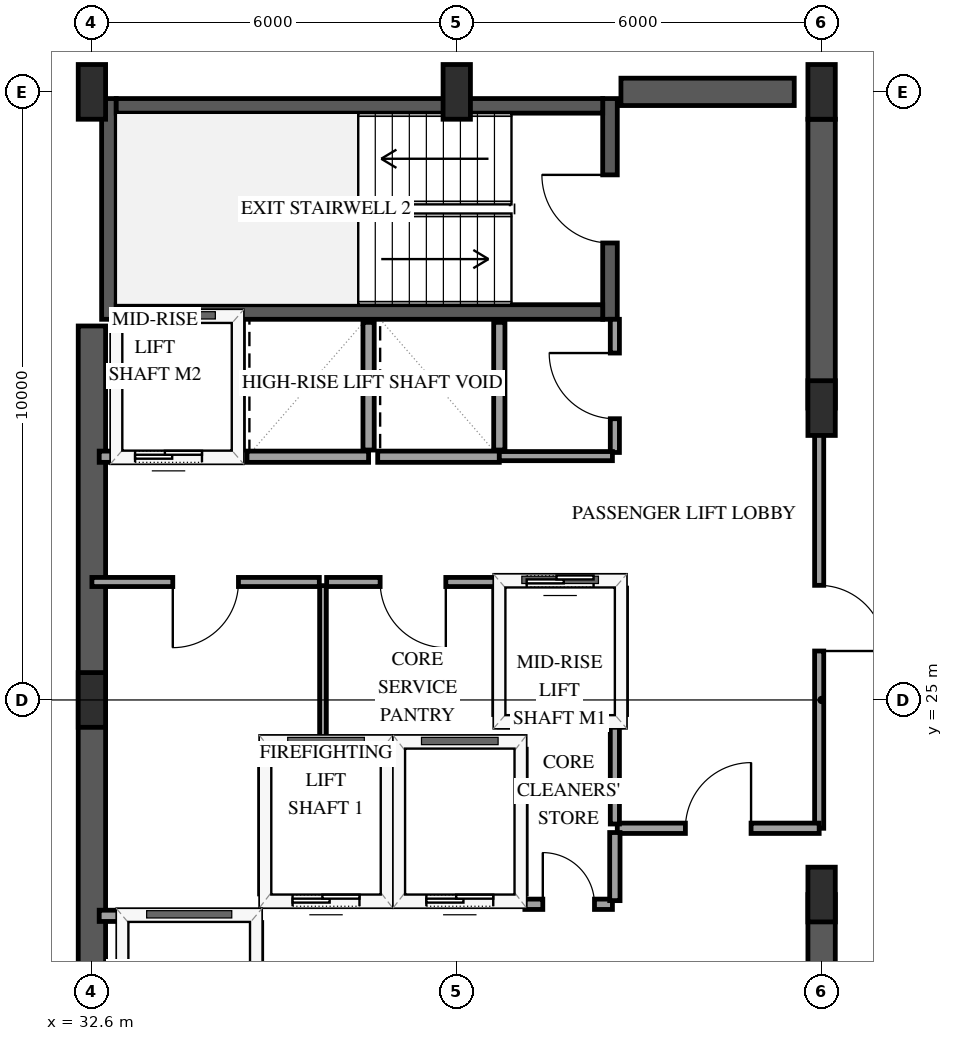
"""IFC4 building model, lengths in metres.
Left out: names, types, materials, properties, quantities, classifications, styles, units other than length and angle.
Written with IfcOpenShell. Run it as: python <this file> out.ifc"""

import sys

from ifc_helpers import new_model, si_unit, direction, frame, frame_2d, origin, origin_2d, place, context, subcontext, project, spatial, rectangle, extrude, element, fill, save


model = new_model("IFC4")
c1 = context("Model", 3, precision=1e-05, world=origin(), true_north=direction((0.0, 1.0)))
c2 = subcontext(c1, "Body", "Model", "MODEL_VIEW")
j1 = project(units=[si_unit("LENGTHUNIT", "METRE"), si_unit("PLANEANGLEUNIT", "RADIAN")], contexts=[c1])
p1 = place(None, origin())
s1 = spatial("IfcSite", under=j1, at=p1, CompositionType="ELEMENT")
p2 = place(p1, origin())
s2 = spatial("IfcBuilding", under=s1, at=p2, CompositionType="ELEMENT")
p3 = place(p2, frame((0.0, 0.0, 215.8)))
s3 = spatial("IfcBuildingStorey", under=s2, at=p3, CompositionType="ELEMENT", Elevation=215.8)
p4 = place(p3, frame((32.88, 31.26, 0.0), z_axis=(0.0, 0.0, 1.0), x_axis=(0.0, 1.0, 0.0)))
e1 = element("IfcWall", 1, at=p4, inside=s3, PredefinedType="SHEAR", context=c2, shape_type="SweptSolid", body=[
    extrude(rectangle(XDim=3.63, YDim=0.24, at=frame_2d((1.815, 0.0))), origin(), (0.0, 0.0, 1.0), 3.6),
])
p5 = place(p3, frame((41.12, 31.26, 0.0), z_axis=(0.0, 0.0, 1.0), x_axis=(0.0, 1.0, 0.0)))
e2 = element("IfcWall", 2, at=p5, inside=s3, PredefinedType="SHEAR", context=c2, shape_type="SweptSolid", body=[
    extrude(rectangle(XDim=3.63, YDim=0.24, at=frame_2d((1.815, 0.0))), origin(), (0.0, 0.0, 1.0), 3.6),
])
p6 = place(p5, frame((1.255, 0.0, 0.0)))
e3 = element("IfcOpeningElement", 3, at=p6, cuts=e2, PredefinedType="OPENING", context=c2, shape_type="SweptSolid", body=[
    extrude(rectangle(XDim=1.12, YDim=2.15, at=frame_2d((0.56, 1.075))), frame((0.0, 0.13, 0.0), z_axis=(0.0, -1.0, 0.0), x_axis=(1.0, 0.0, 0.0)), (0.0, 0.0, 1.0), 0.26),
])
for number, where, z_axis, x_axis in (
    (4, (33.0, 31.38, 0.0), (0.0, 0.0, 1.0), (1.0, 0.0, 0.0)),
    (5, (33.0, 34.77, 0.0), (0.0, 0.0, 1.0), (1.0, 0.0, 0.0)),
):
    element("IfcWall", number, at=place(p3, frame(where, z_axis=z_axis, x_axis=x_axis)), inside=s3, PredefinedType="SHEAR", context=c2, shape_type="SweptSolid", body=[
        extrude(rectangle(XDim=8.0, YDim=0.24, at=frame_2d((4.0, 0.0))), origin(), (0.0, 0.0, 1.0), 3.6),
    ])
p7 = place(p3, frame((32.6, 18.85, 0.0), z_axis=(0.0, 0.0, 1.0), x_axis=(0.0, 1.0, 0.0)))
e6 = element("IfcWall", 6, at=p7, inside=s3, PredefinedType="SHEAR", context=c2, shape_type="SweptSolid", body=[
    extrude(rectangle(XDim=12.3, YDim=0.45, at=frame_2d((6.15, 0.0))), origin(), (0.0, 0.0, 1.0), 3.6),
])
p8 = place(p3, frame((41.3, 35.0, 0.0), z_axis=(0.0, 0.0, 1.0), x_axis=(1.0, 0.0, 0.0)))
e7 = element("IfcWall", 7, at=p8, inside=s3, PredefinedType="SHEAR", context=c2, shape_type="SweptSolid", body=[
    extrude(rectangle(XDim=2.85, YDim=0.45, at=frame_2d((1.425, 0.0))), origin(), (0.0, 0.0, 1.0), 3.6),
])
p9 = place(p3, frame((44.6, 15.45, 0.0), z_axis=(0.0, 0.0, 1.0), x_axis=(0.0, 1.0, 0.0)))
e8 = element("IfcWall", 8, at=p9, inside=s3, PredefinedType="SHEAR", context=c2, shape_type="SweptSolid", body=[
    extrude(rectangle(XDim=6.35, YDim=0.45, at=frame_2d((3.175, 0.0))), origin(), (0.0, 0.0, 1.0), 3.6),
])
p10 = place(p3, frame((44.6, 29.8, 0.0), z_axis=(0.0, 0.0, 1.0), x_axis=(0.0, 1.0, 0.0)))
e9 = element("IfcWall", 9, at=p10, inside=s3, PredefinedType="SHEAR", context=c2, shape_type="SweptSolid", body=[
    extrude(rectangle(XDim=4.75, YDim=0.45, at=frame_2d((2.375, 0.0))), origin(), (0.0, 0.0, 1.0), 3.6),
])
for number, where, z_axis, x_axis in (
    (10, (32.6, 25.0, 0.0), (0.0, 0.0, 1.0), (1.0, 0.0, 0.0)),
    (11, (32.6, 35.0, 0.0), (0.0, 0.0, 1.0), (1.0, 0.0, 0.0)),
    (12, (38.6, 35.0, 0.0), (0.0, 0.0, 1.0), (1.0, 0.0, 0.0)),
    (13, (44.6, 21.8, 0.0), (0.0, 0.0, 1.0), (1.0, 0.0, 0.0)),
    (14, (44.6, 29.8, 0.0), (0.0, 0.0, 1.0), (1.0, 0.0, 0.0)),
    (15, (44.6, 35.0, 0.0), (0.0, 0.0, 1.0), (1.0, 0.0, 0.0)),
):
    element("IfcColumn", number, at=place(p3, frame(where, z_axis=z_axis, x_axis=x_axis)), inside=s3, PredefinedType="PILASTER", context=c2, shape_type="SweptSolid", body=[
        extrude(rectangle(XDim=0.45, YDim=0.9, at=origin_2d()), origin(), (0.0, 0.0, 1.0), 3.6),
    ])
p11 = place(p3, frame((35.45, 21.7, 0.0), z_axis=(0.0, 0.0, 1.0), x_axis=(1.0, 0.0, 0.0)))
e16 = element("IfcWall", 16, at=p11, inside=s3, PredefinedType="SOLIDWALL", context=c2, shape_type="SweptSolid", body=[
    extrude(rectangle(XDim=2.0, YDim=0.185, at=frame_2d((1.0, 0.0))), origin(), (0.0, 0.0, 1.0), 3.3),
])
p12 = place(p11, frame((0.45, 0.0, 0.0)))
e17 = element("IfcOpeningElement", 17, at=p12, cuts=e16, PredefinedType="OPENING", context=c2, shape_type="SweptSolid", body=[
    extrude(rectangle(XDim=1.1, YDim=2.15, at=frame_2d((0.55, 1.075))), frame((0.0, 0.103, 0.0), z_axis=(0.0, -1.0, 0.0), x_axis=(1.0, 0.0, 0.0)), (0.0, 0.0, 1.0), 0.205),
])
p13 = place(p3, frame((35.45, 24.3, 0.0), z_axis=(0.0, 0.0, 1.0), x_axis=(1.0, 0.0, 0.0)))
e18 = element("IfcWall", 18, at=p13, inside=s3, PredefinedType="SOLIDWALL", context=c2, shape_type="SweptSolid", body=[
    extrude(rectangle(XDim=2.0, YDim=0.185, at=frame_2d((1.0, 0.0))), origin(), (0.0, 0.0, 1.0), 3.3),
])
for number, where, z_axis, x_axis in (
    (19, (35.45, 21.81, 0.0), (0.0, 0.0, 1.0), (0.0, 1.0, 0.0)),
    (20, (37.45, 21.81, 0.0), (0.0, 0.0, 1.0), (0.0, 1.0, 0.0)),
):
    element("IfcWall", number, at=place(p3, frame(where, z_axis=z_axis, x_axis=x_axis)), inside=s3, PredefinedType="SOLIDWALL", context=c2, shape_type="SweptSolid", body=[
        extrude(rectangle(XDim=2.38, YDim=0.185, at=frame_2d((1.19, 0.0))), origin(), (0.0, 0.0, 1.0), 3.3),
    ])
p14 = place(p3, frame((37.65, 21.7, 0.0), z_axis=(0.0, 0.0, 1.0), x_axis=(1.0, 0.0, 0.0)))
e21 = element("IfcWall", 21, at=p14, inside=s3, PredefinedType="SOLIDWALL", context=c2, shape_type="SweptSolid", body=[
    extrude(rectangle(XDim=2.0, YDim=0.185, at=frame_2d((1.0, 0.0))), origin(), (0.0, 0.0, 1.0), 3.3),
])
p15 = place(p14, frame((0.45, 0.0, 0.0)))
e22 = element("IfcOpeningElement", 22, at=p15, cuts=e21, PredefinedType="OPENING", context=c2, shape_type="SweptSolid", body=[
    extrude(rectangle(XDim=1.1, YDim=2.15, at=frame_2d((0.55, 1.075))), frame((0.0, 0.103, 0.0), z_axis=(0.0, -1.0, 0.0), x_axis=(1.0, 0.0, 0.0)), (0.0, 0.0, 1.0), 0.205),
])
p16 = place(p3, frame((37.65, 24.3, 0.0), z_axis=(0.0, 0.0, 1.0), x_axis=(1.0, 0.0, 0.0)))
e23 = element("IfcWall", 23, at=p16, inside=s3, PredefinedType="SOLIDWALL", context=c2, shape_type="SweptSolid", body=[
    extrude(rectangle(XDim=2.0, YDim=0.185, at=frame_2d((1.0, 0.0))), origin(), (0.0, 0.0, 1.0), 3.3),
])
p17 = place(p3, frame((39.65, 21.81, 0.0), z_axis=(0.0, 0.0, 1.0), x_axis=(0.0, 1.0, 0.0)))
e24 = element("IfcWall", 24, at=p17, inside=s3, PredefinedType="SOLIDWALL", context=c2, shape_type="SweptSolid", body=[
    extrude(rectangle(XDim=2.38, YDim=0.185, at=frame_2d((1.19, 0.0))), origin(), (0.0, 0.0, 1.0), 3.3),
])
p18 = place(p3, frame((32.72, 21.45, 0.0), z_axis=(0.0, 0.0, 1.0), x_axis=(1.0, 0.0, 0.0)))
e25 = element("IfcWall", 25, at=p18, inside=s3, PredefinedType="SOLIDWALL", context=c2, shape_type="SweptSolid", body=[
    extrude(rectangle(XDim=2.58, YDim=0.185, at=frame_2d((1.29, 0.0))), origin(), (0.0, 0.0, 1.0), 3.3),
])
p19 = place(p3, frame((35.3, 18.79, 0.0), z_axis=(0.0, 0.0, 1.0), x_axis=(0.0, 1.0, 0.0)))
e26 = element("IfcWall", 26, at=p19, inside=s3, PredefinedType="SOLIDWALL", context=c2, shape_type="SweptSolid", body=[
    extrude(rectangle(XDim=2.55, YDim=0.185, at=frame_2d((1.275, 0.0))), origin(), (0.0, 0.0, 1.0), 3.3),
])
p20 = place(p19, frame((0.725, 0.0, 0.0)))
e27 = element("IfcOpeningElement", 27, at=p20, cuts=e26, PredefinedType="OPENING", context=c2, shape_type="SweptSolid", body=[
    extrude(rectangle(XDim=1.1, YDim=2.15, at=frame_2d((0.55, 1.075))), frame((0.0, 0.103, 0.0), z_axis=(0.0, -1.0, 0.0), x_axis=(1.0, 0.0, 0.0)), (0.0, 0.0, 1.0), 0.205),
])
p21 = place(p3, frame((39.3, 24.65, 0.0), z_axis=(0.0, 0.0, 1.0), x_axis=(1.0, 0.0, 0.0)))
e28 = element("IfcWall", 28, at=p21, inside=s3, PredefinedType="SOLIDWALL", context=c2, shape_type="SweptSolid", body=[
    extrude(rectangle(XDim=2.0, YDim=0.185, at=frame_2d((1.0, 0.0))), origin(), (0.0, 0.0, 1.0), 3.3),
])
p22 = place(p3, frame((39.3, 26.95, 0.0), z_axis=(0.0, 0.0, 1.0), x_axis=(1.0, 0.0, 0.0)))
e29 = element("IfcWall", 29, at=p22, inside=s3, PredefinedType="SOLIDWALL", context=c2, shape_type="SweptSolid", body=[
    extrude(rectangle(XDim=2.0, YDim=0.185, at=frame_2d((1.0, 0.0))), origin(), (0.0, 0.0, 1.0), 3.3),
])
p23 = place(p22, frame((0.45, 0.0, 0.0)))
e30 = element("IfcOpeningElement", 30, at=p23, cuts=e29, PredefinedType="OPENING", context=c2, shape_type="SweptSolid", body=[
    extrude(rectangle(XDim=1.1, YDim=2.15, at=frame_2d((0.55, 1.075))), frame((0.0, 0.103, 0.0), z_axis=(0.0, -1.0, 0.0), x_axis=(1.0, 0.0, 0.0)), (0.0, 0.0, 1.0), 0.205),
])
for number, where, z_axis, x_axis in (
    (31, (39.3, 24.76, 0.0), (0.0, 0.0, 1.0), (0.0, 1.0, 0.0)),
    (32, (41.3, 24.76, 0.0), (0.0, 0.0, 1.0), (0.0, 1.0, 0.0)),
):
    element("IfcWall", number, at=place(p3, frame(where, z_axis=z_axis, x_axis=x_axis)), inside=s3, PredefinedType="SOLIDWALL", context=c2, shape_type="SweptSolid", body=[
        extrude(rectangle(XDim=2.08, YDim=0.185, at=frame_2d((1.04, 0.0))), origin(), (0.0, 0.0, 1.0), 3.3),
    ])
p24 = place(p3, frame((32.72, 29.0, 0.0), z_axis=(0.0, 0.0, 1.0), x_axis=(1.0, 0.0, 0.0)))
e33 = element("IfcWall", 33, at=p24, inside=s3, PredefinedType="SOLIDWALL", context=c2, shape_type="SweptSolid", body=[
    extrude(rectangle(XDim=2.28, YDim=0.185, at=frame_2d((1.14, 0.0))), origin(), (0.0, 0.0, 1.0), 3.3),
])
p25 = place(p24, frame((0.59, 0.0, 0.0)))
e34 = element("IfcOpeningElement", 34, at=p25, cuts=e33, PredefinedType="OPENING", context=c2, shape_type="SweptSolid", body=[
    extrude(rectangle(XDim=1.1, YDim=2.15, at=frame_2d((0.55, 1.075))), frame((0.0, 0.103, 0.0), z_axis=(0.0, -1.0, 0.0), x_axis=(1.0, 0.0, 0.0)), (0.0, 0.0, 1.0), 0.205),
])
p26 = place(p3, frame((35.0, 29.11, 0.0), z_axis=(0.0, 0.0, 1.0), x_axis=(0.0, 1.0, 0.0)))
e35 = element("IfcWall", 35, at=p26, inside=s3, PredefinedType="SOLIDWALL", context=c2, shape_type="SweptSolid", body=[
    extrude(rectangle(XDim=2.1, YDim=0.185, at=frame_2d((1.05, 0.0))), origin(), (0.0, 0.0, 1.0), 3.3),
])
p27 = place(p3, frame((35.15, 29.0, 0.0), z_axis=(0.0, 0.0, 1.0), x_axis=(1.0, 0.0, 0.0)))
e36 = element("IfcWall", 36, at=p27, inside=s3, PredefinedType="SOLIDWALL", context=c2, shape_type="SweptSolid", body=[
    extrude(rectangle(XDim=2.0, YDim=0.185, at=frame_2d((1.0, 0.0))), origin(), (0.0, 0.0, 1.0), 3.3),
])
p28 = place(p3, frame((37.15, 29.11, 0.0), z_axis=(0.0, 0.0, 1.0), x_axis=(0.0, 1.0, 0.0)))
e37 = element("IfcWall", 37, at=p28, inside=s3, PredefinedType="SOLIDWALL", context=c2, shape_type="SweptSolid", body=[
    extrude(rectangle(XDim=2.1, YDim=0.185, at=frame_2d((1.05, 0.0))), origin(), (0.0, 0.0, 1.0), 3.3),
])
p29 = place(p3, frame((37.3, 29.0, 0.0), z_axis=(0.0, 0.0, 1.0), x_axis=(1.0, 0.0, 0.0)))
e38 = element("IfcWall", 38, at=p29, inside=s3, PredefinedType="SOLIDWALL", context=c2, shape_type="SweptSolid", body=[
    extrude(rectangle(XDim=2.0, YDim=0.185, at=frame_2d((1.0, 0.0))), origin(), (0.0, 0.0, 1.0), 3.3),
])
p30 = place(p3, frame((39.3, 29.11, 0.0), z_axis=(0.0, 0.0, 1.0), x_axis=(0.0, 1.0, 0.0)))
e39 = element("IfcWall", 39, at=p30, inside=s3, PredefinedType="SOLIDWALL", context=c2, shape_type="SweptSolid", body=[
    extrude(rectangle(XDim=2.1, YDim=0.185, at=frame_2d((1.05, 0.0))), origin(), (0.0, 0.0, 1.0), 3.3),
])
p31 = place(p3, frame((44.56, 29.8, 0.0), z_axis=(0.0, 0.0, 1.0), x_axis=(0.0, -1.0, 0.0)))
e40 = element("IfcWall", 40, at=p31, inside=s3, PredefinedType="PARTITIONING", context=c2, shape_type="SweptSolid", body=[
    extrude(rectangle(XDim=6.91, YDim=0.15, at=frame_2d((3.455, 0.0))), origin(), (0.0, 0.0, 1.0), 2.34),
])
p32 = place(p31, frame((2.915, 0.0, 0.0)))
e41 = element("IfcOpeningElement", 41, at=p32, cuts=e40, PredefinedType="OPENING", context=c2, shape_type="SweptSolid", body=[
    extrude(rectangle(XDim=1.08, YDim=2.15, at=frame_2d((0.54, 1.075))), frame((0.0, 0.085, 0.0), z_axis=(0.0, -1.0, 0.0), x_axis=(1.0, 0.0, 0.0)), (0.0, 0.0, 1.0), 0.17),
])
p33 = place(p3, frame((36.34, 26.94, 0.0), z_axis=(0.0, 0.0, 1.0), x_axis=(-1.0, 0.0, 0.0)))
e42 = element("IfcWall", 42, at=p33, inside=s3, PredefinedType="PARTITIONING", context=c2, shape_type="SweptSolid", body=[
    extrude(rectangle(XDim=3.74, YDim=0.15, at=frame_2d((1.87, 0.0))), origin(), (0.0, 0.0, 1.0), 3.3),
])
p34 = place(p33, frame((1.33, 0.0, 0.0)))
e43 = element("IfcOpeningElement", 43, at=p34, cuts=e42, PredefinedType="OPENING", context=c2, shape_type="SweptSolid", body=[
    extrude(rectangle(XDim=1.08, YDim=2.15, at=frame_2d((0.54, 1.075))), frame((0.0, 0.085, 0.0), z_axis=(0.0, -1.0, 0.0), x_axis=(1.0, 0.0, 0.0)), (0.0, 0.0, 1.0), 0.17),
])
p35 = place(p3, frame((41.24, 22.89, 0.0), z_axis=(0.0, 0.0, 1.0), x_axis=(1.0, 0.0, 0.0)))
e44 = element("IfcWall", 44, at=p35, inside=s3, PredefinedType="PARTITIONING", context=c2, shape_type="SweptSolid", body=[
    extrude(rectangle(XDim=3.32, YDim=0.17, at=frame_2d((1.66, 0.0))), origin(), (0.0, 0.0, 1.0), 3.3),
])
p36 = place(p35, frame((1.12, 0.0, 0.0)))
e45 = element("IfcOpeningElement", 45, at=p36, cuts=e44, PredefinedType="OPENING", context=c2, shape_type="SweptSolid", body=[
    extrude(rectangle(XDim=1.08, YDim=2.15, at=frame_2d((0.54, 1.075))), frame((0.0, 0.095, 0.0), z_axis=(0.0, -1.0, 0.0), x_axis=(1.0, 0.0, 0.0)), (0.0, 0.0, 1.0), 0.19),
])
p37 = place(p3, frame((39.3, 26.94, 0.0), z_axis=(0.0, 0.0, 1.0), x_axis=(-1.0, 0.0, 0.0)))
e46 = element("IfcWall", 46, at=p37, inside=s3, PredefinedType="PARTITIONING", context=c2, shape_type="SweptSolid", body=[
    extrude(rectangle(XDim=2.84, YDim=0.15, at=frame_2d((1.42, 0.0))), origin(), (0.0, 0.0, 1.0), 3.3),
])
p38 = place(p37, frame((0.88, 0.0, 0.0)))
e47 = element("IfcOpeningElement", 47, at=p38, cuts=e46, PredefinedType="OPENING", context=c2, shape_type="SweptSolid", body=[
    extrude(rectangle(XDim=1.08, YDim=2.15, at=frame_2d((0.54, 1.075))), frame((0.0, 0.085, 0.0), z_axis=(0.0, -1.0, 0.0), x_axis=(1.0, 0.0, 0.0)), (0.0, 0.0, 1.0), 0.17),
])
p39 = place(p3, frame((36.4, 26.88, 0.0), z_axis=(0.0, 0.0, 1.0), x_axis=(0.0, -1.0, 0.0)))
e48 = element("IfcWall", 48, at=p39, inside=s3, PredefinedType="PARTITIONING", context=c2, shape_type="SweptSolid", body=[
    extrude(rectangle(XDim=2.58, YDim=0.11, at=frame_2d((1.29, 0.0))), origin(), (0.0, 0.0, 1.0), 3.3),
])
p40 = place(p3, frame((41.2, 29.07, 0.0), z_axis=(0.0, 0.0, 1.0), x_axis=(0.0, 1.0, 0.0)))
e49 = element("IfcWall", 49, at=p40, inside=s3, PredefinedType="PARTITIONING", context=c2, shape_type="SweptSolid", body=[
    extrude(rectangle(XDim=2.19, YDim=0.15, at=frame_2d((1.095, 0.0))), origin(), (0.0, 0.0, 1.0), 3.3),
])
p41 = place(p40, frame((0.555, 0.0, 0.0)))
e50 = element("IfcOpeningElement", 50, at=p41, cuts=e49, PredefinedType="OPENING", context=c2, shape_type="SweptSolid", body=[
    extrude(rectangle(XDim=1.08, YDim=2.15, at=frame_2d((0.54, 1.075))), frame((0.0, 0.085, 0.0), z_axis=(0.0, -1.0, 0.0), x_axis=(1.0, 0.0, 0.0)), (0.0, 0.0, 1.0), 0.17),
])
p42 = place(p3, frame((39.3, 29.01, 0.0), z_axis=(0.0, 0.0, 1.0), x_axis=(1.0, 0.0, 0.0)))
e51 = element("IfcWall", 51, at=p42, inside=s3, PredefinedType="PARTITIONING", context=c2, shape_type="SweptSolid", body=[
    extrude(rectangle(XDim=1.86, YDim=0.15, at=frame_2d((0.93, 0.0))), origin(), (0.0, 0.0, 1.0), 3.3),
])
p43 = place(p3, frame((41.2, 22.96, 0.0), z_axis=(0.0, 0.0, 1.0), x_axis=(0.0, 1.0, 0.0)))
e52 = element("IfcWall", 52, at=p43, inside=s3, PredefinedType="PARTITIONING", context=c2, shape_type="SweptSolid", body=[
    extrude(rectangle(XDim=1.69, YDim=0.15, at=frame_2d((0.845, 0.0))), origin(), (0.0, 0.0, 1.0), 3.3),
])
p44 = place(p3, frame((39.72, 21.64, 0.0), z_axis=(0.0, 0.0, 1.0), x_axis=(1.0, 0.0, 0.0)))
e53 = element("IfcWall", 53, at=p44, inside=s3, PredefinedType="PARTITIONING", context=c2, shape_type="SweptSolid", body=[
    extrude(rectangle(XDim=1.44, YDim=0.17, at=frame_2d((0.72, 0.0))), origin(), (0.0, 0.0, 1.0), 3.3),
])
p45 = place(p44, frame((0.295, 0.0, 0.0)))
e54 = element("IfcOpeningElement", 54, at=p45, cuts=e53, PredefinedType="OPENING", context=c2, shape_type="SweptSolid", body=[
    extrude(rectangle(XDim=0.85, YDim=2.1, at=frame_2d((0.425, 1.05))), frame((0.0, 0.095, 0.0), z_axis=(0.0, -1.0, 0.0), x_axis=(1.0, 0.0, 0.0)), (0.0, 0.0, 1.0), 0.19),
])
p46 = place(p3, frame((41.2, 21.7, 0.0), z_axis=(0.0, 0.0, 1.0), x_axis=(0.0, 1.0, 0.0)))
e55 = element("IfcWall", 55, at=p46, inside=s3, PredefinedType="PARTITIONING", context=c2, shape_type="SweptSolid", body=[
    extrude(rectangle(XDim=1.12, YDim=0.17, at=frame_2d((0.56, 0.0))), origin(), (0.0, 0.0, 1.0), 3.3),
])
p47 = place(p12, origin())
e56 = element("IfcDoor", 56, at=p47, inside=s3, OperationType="SLIDING_TO_LEFT", PredefinedType="DOOR", context=c2, shape_type="SweptSolid", body=[
    extrude(rectangle(XDim=1.1, YDim=2.15, at=frame_2d((0.55, 1.075))), frame((0.0, 0.025, 0.0), z_axis=(0.0, -1.0, 0.0), x_axis=(1.0, 0.0, 0.0)), (0.0, 0.0, 1.0), 0.05),
])
fill(e17, e56)
p48 = place(p15, origin())
e57 = element("IfcDoor", 57, at=p48, inside=s3, OperationType="SLIDING_TO_LEFT", PredefinedType="DOOR", context=c2, shape_type="SweptSolid", body=[
    extrude(rectangle(XDim=1.1, YDim=2.15, at=frame_2d((0.55, 1.075))), frame((0.0, 0.025, 0.0), z_axis=(0.0, -1.0, 0.0), x_axis=(1.0, 0.0, 0.0)), (0.0, 0.0, 1.0), 0.05),
])
fill(e22, e57)
p49 = place(p23, origin())
e58 = element("IfcDoor", 58, at=p49, inside=s3, OperationType="SLIDING_TO_LEFT", PredefinedType="DOOR", context=c2, shape_type="SweptSolid", body=[
    extrude(rectangle(XDim=1.1, YDim=2.15, at=frame_2d((0.55, 1.075))), frame((0.0, 0.025, 0.0), z_axis=(0.0, -1.0, 0.0), x_axis=(1.0, 0.0, 0.0)), (0.0, 0.0, 1.0), 0.05),
])
fill(e30, e58)
p50 = place(p25, origin())
e59 = element("IfcDoor", 59, at=p50, inside=s3, OperationType="SLIDING_TO_LEFT", PredefinedType="DOOR", context=c2, shape_type="SweptSolid", body=[
    extrude(rectangle(XDim=1.1, YDim=2.15, at=frame_2d((0.55, 1.075))), frame((0.0, 0.025, 0.0), z_axis=(0.0, -1.0, 0.0), x_axis=(1.0, 0.0, 0.0)), (0.0, 0.0, 1.0), 0.05),
])
fill(e34, e59)
p51 = place(p6, origin())
e60 = element("IfcDoor", 60, at=p51, inside=s3, OperationType="SINGLE_SWING_RIGHT", PredefinedType="DOOR", context=c2, shape_type="SweptSolid", body=[
    extrude(rectangle(XDim=1.12, YDim=2.15, at=frame_2d((0.56, 1.075))), frame((0.0, 0.025, 0.0), z_axis=(0.0, -1.0, 0.0), x_axis=(1.0, 0.0, 0.0)), (0.0, 0.0, 1.0), 0.05),
])
fill(e3, e60)
p52 = place(p32, origin())
e61 = element("IfcDoor", 61, at=p52, inside=s3, OperationType="SINGLE_SWING_RIGHT", PredefinedType="DOOR", context=c2, shape_type="SweptSolid", body=[
    extrude(rectangle(XDim=1.08, YDim=2.15, at=frame_2d((0.54, 1.075))), frame((0.0, 0.025, 0.0), z_axis=(0.0, -1.0, 0.0), x_axis=(1.0, 0.0, 0.0)), (0.0, 0.0, 1.0), 0.05),
])
fill(e41, e61)
p53 = place(p34, origin())
e62 = element("IfcDoor", 62, at=p53, inside=s3, OperationType="SINGLE_SWING_RIGHT", PredefinedType="DOOR", context=c2, shape_type="SweptSolid", body=[
    extrude(rectangle(XDim=1.08, YDim=2.15, at=frame_2d((0.54, 1.075))), frame((0.0, 0.025, 0.0), z_axis=(0.0, -1.0, 0.0), x_axis=(1.0, 0.0, 0.0)), (0.0, 0.0, 1.0), 0.05),
])
fill(e43, e62)
p54 = place(p36, origin())
e63 = element("IfcDoor", 63, at=p54, inside=s3, OperationType="SINGLE_SWING_RIGHT", PredefinedType="DOOR", context=c2, shape_type="SweptSolid", body=[
    extrude(rectangle(XDim=1.08, YDim=2.15, at=frame_2d((0.54, 1.075))), frame((0.0, 0.025, 0.0), z_axis=(0.0, -1.0, 0.0), x_axis=(1.0, 0.0, 0.0)), (0.0, 0.0, 1.0), 0.05),
])
fill(e45, e63)
p55 = place(p38, origin())
e64 = element("IfcDoor", 64, at=p55, inside=s3, OperationType="SINGLE_SWING_LEFT", PredefinedType="DOOR", context=c2, shape_type="SweptSolid", body=[
    extrude(rectangle(XDim=1.08, YDim=2.15, at=frame_2d((0.54, 1.075))), frame((0.0, 0.025, 0.0), z_axis=(0.0, -1.0, 0.0), x_axis=(1.0, 0.0, 0.0)), (0.0, 0.0, 1.0), 0.05),
])
fill(e47, e64)
p56 = place(p41, origin())
e65 = element("IfcDoor", 65, at=p56, inside=s3, OperationType="SINGLE_SWING_RIGHT", PredefinedType="DOOR", context=c2, shape_type="SweptSolid", body=[
    extrude(rectangle(XDim=1.08, YDim=2.15, at=frame_2d((0.54, 1.075))), frame((0.0, 0.025, 0.0), z_axis=(0.0, -1.0, 0.0), x_axis=(1.0, 0.0, 0.0)), (0.0, 0.0, 1.0), 0.05),
])
fill(e50, e65)
p57 = place(p45, origin())
e66 = element("IfcDoor", 66, at=p57, inside=s3, OperationType="SINGLE_SWING_LEFT", PredefinedType="DOOR", context=c2, shape_type="SweptSolid", body=[
    extrude(rectangle(XDim=0.85, YDim=2.1, at=frame_2d((0.425, 1.05))), frame((0.0, 0.025, 0.0), z_axis=(0.0, -1.0, 0.0), x_axis=(1.0, 0.0, 0.0)), (0.0, 0.0, 1.0), 0.05),
])
fill(e54, e66)
save(model, sys.argv[1])
